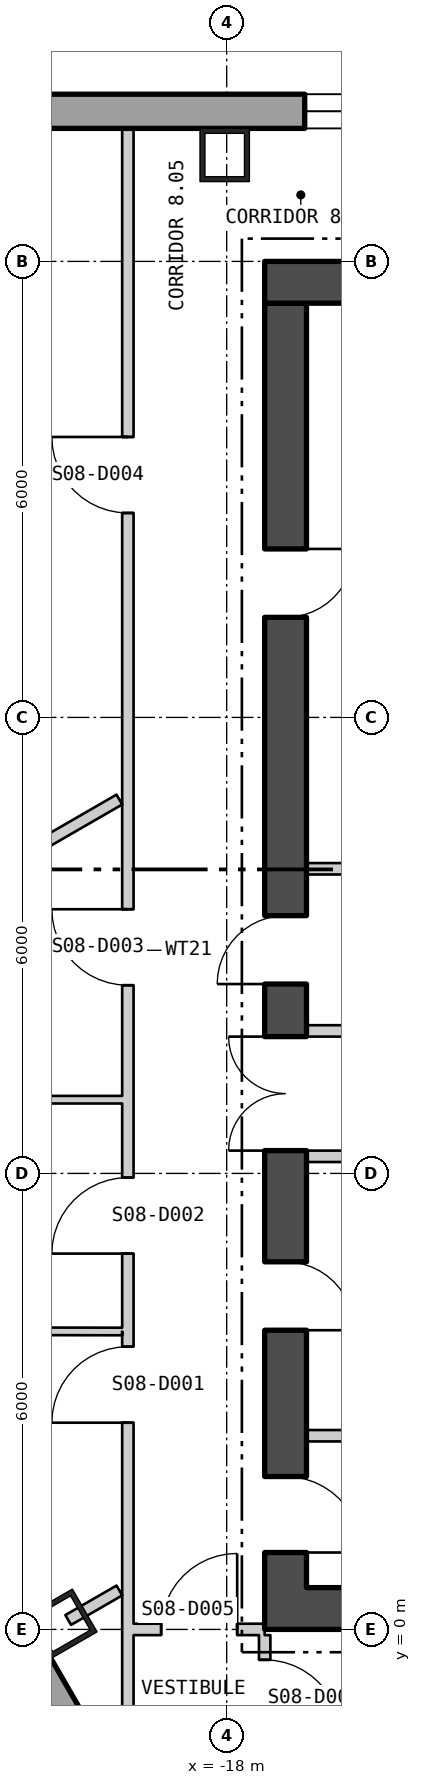
"""IFC4 building model, lengths in metres.
Left out: names, types, materials, properties, quantities, classifications, styles, units other than length and angle.
Written with IfcOpenShell. Run it as: python <this file> out.ifc"""

import sys

from ifc_helpers import new_model, si_unit, direction, frame, frame_2d, origin, origin_2d, place, context, subcontext, project, spatial, polyline, rectangle, hollow_rectangle, outline, extrude, element, fill, save


model = new_model("IFC4")
c1 = context("Model", 3, precision=1e-05, world=origin(), true_north=direction((0.0, 1.0)))
c2 = subcontext(c1, "Body", "Model", "MODEL_VIEW")
j1 = project(units=[si_unit("LENGTHUNIT", "METRE"), si_unit("PLANEANGLEUNIT", "RADIAN")], contexts=[c1])
p1 = place(None, origin())
s1 = spatial("IfcSite", under=j1, at=p1, CompositionType="ELEMENT")
p2 = place(p1, origin())
s2 = spatial("IfcBuilding", under=s1, at=p2, CompositionType="ELEMENT")
p3 = place(p2, frame((0.0, 0.0, 111.3)))
s3 = spatial("IfcBuildingStorey", under=s2, at=p3, CompositionType="ELEMENT", Elevation=111.3)
for number, where, z_axis, x_axis in (
    (1, (-18.026, 19.4, 0.0), (0.0, 0.0, 1.0), (-1.0, 0.0, 0.0)),
    (2, (-20.171, 0.074, 0.0), (0.0, 0.0, 1.0), (0.5, -0.866, 0.0)),
):
    element("IfcColumn", number, at=place(p3, frame(where, z_axis=z_axis, x_axis=x_axis)), inside=s3, PredefinedType="COLUMN", context=c2, shape_type="SweptSolid", body=[
        extrude(hollow_rectangle(XDim=0.65, YDim=0.7, WallThickness=0.065, at=origin_2d()), origin(), (0.0, 0.0, 1.0), 4.5),
    ])
p4 = place(p3, frame((22.865, 19.975, -0.4), z_axis=(0.0, 0.0, 1.0), x_axis=(-1.0, 0.0, 0.0)))
e3 = element("IfcWall", 3, at=p4, inside=s3, PredefinedType="SOLIDWALL", context=c2, shape_type="SweptSolid", body=[
    extrude(outline(polyline([(-0.13, -0.225), (45.86, -0.225), (45.6, 0.225), (0.13, 0.225), (-0.13, -0.225)])), origin(), (0.0, 0.0, 1.0), 4.5),
])
p5 = place(p4, frame((5.892, 0.0, 1.3)))
e4 = element("IfcOpeningElement", 4, at=p5, cuts=e3, PredefinedType="OPENING", context=c2, shape_type="SweptSolid", body=[
    extrude(rectangle(XDim=2.4, YDim=2.6, at=frame_2d((1.2, 1.3))), frame((0.0, 0.235, 0.0), z_axis=(0.0, -1.0, 0.0), x_axis=(1.0, 0.0, 0.0)), (0.0, 0.0, 1.0), 0.47),
])
p6 = place(p4, frame((10.399, 0.0, 1.3)))
e5 = element("IfcOpeningElement", 5, at=p6, cuts=e3, PredefinedType="OPENING", context=c2, shape_type="SweptSolid", body=[
    extrude(rectangle(XDim=2.4, YDim=2.6, at=frame_2d((1.2, 1.3))), frame((0.0, 0.235, 0.0), z_axis=(0.0, -1.0, 0.0), x_axis=(1.0, 0.0, 0.0)), (0.0, 0.0, 1.0), 0.47),
])
p7 = place(p4, frame((14.905, 0.0, 1.3)))
e6 = element("IfcOpeningElement", 6, at=p7, cuts=e3, PredefinedType="OPENING", context=c2, shape_type="SweptSolid", body=[
    extrude(rectangle(XDim=2.4, YDim=2.6, at=frame_2d((1.2, 1.3))), frame((0.0, 0.235, 0.0), z_axis=(0.0, -1.0, 0.0), x_axis=(1.0, 0.0, 0.0)), (0.0, 0.0, 1.0), 0.47),
])
p8 = place(p4, frame((19.412, 0.0, 1.3)))
e7 = element("IfcOpeningElement", 7, at=p8, cuts=e3, PredefinedType="OPENING", context=c2, shape_type="SweptSolid", body=[
    extrude(rectangle(XDim=2.4, YDim=2.6, at=frame_2d((1.2, 1.3))), frame((0.0, 0.235, 0.0), z_axis=(0.0, -1.0, 0.0), x_axis=(1.0, 0.0, 0.0)), (0.0, 0.0, 1.0), 0.47),
])
p9 = place(p4, frame((23.918, 0.0, 1.3)))
e8 = element("IfcOpeningElement", 8, at=p9, cuts=e3, PredefinedType="OPENING", context=c2, shape_type="SweptSolid", body=[
    extrude(rectangle(XDim=2.4, YDim=2.6, at=frame_2d((1.2, 1.3))), frame((0.0, 0.235, 0.0), z_axis=(0.0, -1.0, 0.0), x_axis=(1.0, 0.0, 0.0)), (0.0, 0.0, 1.0), 0.47),
])
p10 = place(p4, frame((28.425, 0.0, 1.3)))
e9 = element("IfcOpeningElement", 9, at=p10, cuts=e3, PredefinedType="OPENING", context=c2, shape_type="SweptSolid", body=[
    extrude(rectangle(XDim=2.4, YDim=2.6, at=frame_2d((1.2, 1.3))), frame((0.0, 0.235, 0.0), z_axis=(0.0, -1.0, 0.0), x_axis=(1.0, 0.0, 0.0)), (0.0, 0.0, 1.0), 0.47),
])
p11 = place(p4, frame((32.932, 0.0, 1.3)))
e10 = element("IfcOpeningElement", 10, at=p11, cuts=e3, PredefinedType="OPENING", context=c2, shape_type="SweptSolid", body=[
    extrude(rectangle(XDim=2.4, YDim=2.6, at=frame_2d((1.2, 1.3))), frame((0.0, 0.235, 0.0), z_axis=(0.0, -1.0, 0.0), x_axis=(1.0, 0.0, 0.0)), (0.0, 0.0, 1.0), 0.47),
])
p12 = place(p4, frame((37.438, 0.0, 1.3)))
e11 = element("IfcOpeningElement", 11, at=p12, cuts=e3, PredefinedType="OPENING", context=c2, shape_type="SweptSolid", body=[
    extrude(rectangle(XDim=2.4, YDim=2.6, at=frame_2d((1.2, 1.3))), frame((0.0, 0.235, 0.0), z_axis=(0.0, -1.0, 0.0), x_axis=(1.0, 0.0, 0.0)), (0.0, 0.0, 1.0), 0.47),
])
p13 = place(p3, frame((-27.595, 11.782, -0.18), z_axis=(0.0, 0.0, 1.0), x_axis=(0.500000141277, -0.866025322218, 0.0)))
e12 = element("IfcWall", 12, at=p13, inside=s3, PredefinedType="SOLIDWALL", context=c2, shape_type="SweptSolid", body=[
    extrude(outline(polyline([(-0.13, -0.225), (45.86, -0.225), (45.6, 0.225), (0.13, 0.225), (-0.13, -0.225)])), origin(), (0.0, 0.0, 1.0), 4.28),
])
p14 = place(p13, frame((1.424, 0.0, 1.08)))
e13 = element("IfcOpeningElement", 13, at=p14, cuts=e12, PredefinedType="OPENING", context=c2, shape_type="SweptSolid", body=[
    extrude(rectangle(XDim=2.4, YDim=2.6, at=frame_2d((1.2, 1.3))), frame((0.0, 0.235, 0.0), z_axis=(0.0, -1.0, 0.0), x_axis=(1.0, 0.0, 0.0)), (0.0, 0.0, 1.0), 0.47),
])
p15 = place(p13, frame((5.892, 0.0, 1.08)))
e14 = element("IfcOpeningElement", 14, at=p15, cuts=e12, PredefinedType="OPENING", context=c2, shape_type="SweptSolid", body=[
    extrude(rectangle(XDim=2.4, YDim=2.6, at=frame_2d((1.2, 1.3))), frame((0.0, 0.235, 0.0), z_axis=(0.0, -1.0, 0.0), x_axis=(1.0, 0.0, 0.0)), (0.0, 0.0, 1.0), 0.47),
])
p16 = place(p13, frame((10.399, 0.0, 1.08)))
e15 = element("IfcOpeningElement", 15, at=p16, cuts=e12, PredefinedType="OPENING", context=c2, shape_type="SweptSolid", body=[
    extrude(rectangle(XDim=2.4, YDim=2.6, at=frame_2d((1.2, 1.3))), frame((0.0, 0.235, 0.0), z_axis=(0.0, -1.0, 0.0), x_axis=(1.0, 0.0, 0.0)), (0.0, 0.0, 1.0), 0.47),
])
p17 = place(p13, frame((14.905, 0.0, 1.08)))
e16 = element("IfcOpeningElement", 16, at=p17, cuts=e12, PredefinedType="OPENING", context=c2, shape_type="SweptSolid", body=[
    extrude(rectangle(XDim=2.4, YDim=2.6, at=frame_2d((1.2, 1.3))), frame((0.0, 0.235, 0.0), z_axis=(0.0, -1.0, 0.0), x_axis=(1.0, 0.0, 0.0)), (0.0, 0.0, 1.0), 0.47),
])
p18 = place(p13, frame((19.412, 0.0, 1.08)))
e17 = element("IfcOpeningElement", 17, at=p18, cuts=e12, PredefinedType="OPENING", context=c2, shape_type="SweptSolid", body=[
    extrude(rectangle(XDim=2.4, YDim=2.6, at=frame_2d((1.2, 1.3))), frame((0.0, 0.235, 0.0), z_axis=(0.0, -1.0, 0.0), x_axis=(1.0, 0.0, 0.0)), (0.0, 0.0, 1.0), 0.47),
])
p19 = place(p13, frame((23.918, 0.0, 1.08)))
e18 = element("IfcOpeningElement", 18, at=p19, cuts=e12, PredefinedType="OPENING", context=c2, shape_type="SweptSolid", body=[
    extrude(rectangle(XDim=2.4, YDim=2.6, at=frame_2d((1.2, 1.3))), frame((0.0, 0.235, 0.0), z_axis=(0.0, -1.0, 0.0), x_axis=(1.0, 0.0, 0.0)), (0.0, 0.0, 1.0), 0.47),
])
p20 = place(p13, frame((28.425, 0.0, 1.08)))
e19 = element("IfcOpeningElement", 19, at=p20, cuts=e12, PredefinedType="OPENING", context=c2, shape_type="SweptSolid", body=[
    extrude(rectangle(XDim=2.4, YDim=2.6, at=frame_2d((1.2, 1.3))), frame((0.0, 0.235, 0.0), z_axis=(0.0, -1.0, 0.0), x_axis=(1.0, 0.0, 0.0)), (0.0, 0.0, 1.0), 0.47),
])
p21 = place(p13, frame((32.932, 0.0, 1.08)))
e20 = element("IfcOpeningElement", 20, at=p21, cuts=e12, PredefinedType="OPENING", context=c2, shape_type="SweptSolid", body=[
    extrude(rectangle(XDim=2.4, YDim=2.6, at=frame_2d((1.2, 1.3))), frame((0.0, 0.235, 0.0), z_axis=(0.0, -1.0, 0.0), x_axis=(1.0, 0.0, 0.0)), (0.0, 0.0, 1.0), 0.47),
])
p22 = place(p13, frame((37.438, 0.0, 1.08)))
e21 = element("IfcOpeningElement", 21, at=p22, cuts=e12, PredefinedType="OPENING", context=c2, shape_type="SweptSolid", body=[
    extrude(rectangle(XDim=2.4, YDim=2.6, at=frame_2d((1.2, 1.3))), frame((0.0, 0.235, 0.0), z_axis=(0.0, -1.0, 0.0), x_axis=(1.0, 0.0, 0.0)), (0.0, 0.0, 1.0), 0.47),
])
p23 = place(p13, frame((41.907, 0.0, 1.08)))
e22 = element("IfcOpeningElement", 22, at=p23, cuts=e12, PredefinedType="OPENING", context=c2, shape_type="SweptSolid", body=[
    extrude(rectangle(XDim=2.4, YDim=2.6, at=frame_2d((1.2, 1.3))), frame((0.0, 0.235, 0.0), z_axis=(0.0, -1.0, 0.0), x_axis=(1.0, 0.0, 0.0)), (0.0, 0.0, 1.0), 0.47),
])
p24 = place(p3, frame((-17.5, 0.275, 0.0), z_axis=(0.0, 0.0, 1.0), x_axis=(1.0, 0.0, 0.0)))
e23 = element("IfcWall", 23, at=p24, inside=s3, PredefinedType="SHEAR", context=c2, shape_type="SweptSolid", body=[
    extrude(rectangle(XDim=35.0, YDim=0.55, at=frame_2d((17.5, 0.0))), origin(), (0.0, 0.0, 1.0), 4.3),
])
p25 = place(p24, frame((12.0, 0.0, 0.0)))
e24 = element("IfcOpeningElement", 24, at=p25, cuts=e23, PredefinedType="OPENING", context=c2, shape_type="SweptSolid", body=[
    extrude(rectangle(XDim=1.8, YDim=2.4, at=frame_2d((0.9, 1.2))), frame((0.0, 0.285, 0.0), z_axis=(0.0, -1.0, 0.0), x_axis=(1.0, 0.0, 0.0)), (0.0, 0.0, 1.0), 0.57),
])
p26 = place(p24, frame((22.0, 0.0, 0.0)))
e25 = element("IfcOpeningElement", 25, at=p26, cuts=e23, PredefinedType="OPENING", context=c2, shape_type="SweptSolid", body=[
    extrude(rectangle(XDim=1.8, YDim=2.4, at=frame_2d((0.9, 1.2))), frame((0.0, 0.285, 0.0), z_axis=(0.0, -1.0, 0.0), x_axis=(1.0, 0.0, 0.0)), (0.0, 0.0, 1.0), 0.57),
])
p27 = place(p3, frame((-17.5, 17.725, 0.0), z_axis=(0.0, 0.0, 1.0), x_axis=(1.0, 0.0, 0.0)))
e26 = element("IfcWall", 26, at=p27, inside=s3, PredefinedType="SHEAR", context=c2, shape_type="SweptSolid", body=[
    extrude(rectangle(XDim=35.0, YDim=0.55, at=frame_2d((17.5, 0.0))), origin(), (0.0, 0.0, 1.0), 4.3),
])
p28 = place(p3, frame((-17.225, 0.55, 0.0), z_axis=(0.0, 0.0, 1.0), x_axis=(0.0, 1.0, 0.0)))
e27 = element("IfcWall", 27, at=p28, inside=s3, PredefinedType="SHEAR", context=c2, shape_type="SweptSolid", body=[
    extrude(rectangle(XDim=16.9, YDim=0.55, at=frame_2d((8.45, 0.0))), origin(), (0.0, 0.0, 1.0), 4.3),
])
p29 = place(p28, frame((5.75, 0.0, 0.0)))
e28 = element("IfcOpeningElement", 28, at=p29, cuts=e27, PredefinedType="OPENING", context=c2, shape_type="SweptSolid", body=[
    extrude(rectangle(XDim=1.5, YDim=2.1, at=frame_2d((0.75, 1.05))), frame((0.0, 0.285, 0.0), z_axis=(0.0, -1.0, 0.0), x_axis=(1.0, 0.0, 0.0)), (0.0, 0.0, 1.0), 0.57),
])
p30 = place(p28, frame((0.462, 0.0, 0.0)))
e29 = element("IfcOpeningElement", 29, at=p30, cuts=e27, PredefinedType="OPENING", context=c2, shape_type="SweptSolid", body=[
    extrude(rectangle(XDim=1.0, YDim=2.1, at=frame_2d((0.5, 1.05))), frame((0.0, 0.285, 0.0), z_axis=(0.0, -1.0, 0.0), x_axis=(1.0, 0.0, 0.0)), (0.0, 0.0, 1.0), 0.57),
])
p31 = place(p28, frame((3.387, 0.0, 0.0)))
e30 = element("IfcOpeningElement", 30, at=p31, cuts=e27, PredefinedType="OPENING", context=c2, shape_type="SweptSolid", body=[
    extrude(rectangle(XDim=0.9, YDim=2.1, at=frame_2d((0.45, 1.05))), frame((0.0, 0.285, 0.0), z_axis=(0.0, -1.0, 0.0), x_axis=(1.0, 0.0, 0.0)), (0.0, 0.0, 1.0), 0.57),
])
p32 = place(p28, frame((7.942, 0.0, 0.0)))
e31 = element("IfcOpeningElement", 31, at=p32, cuts=e27, PredefinedType="OPENING", context=c2, shape_type="SweptSolid", body=[
    extrude(rectangle(XDim=0.9, YDim=2.1, at=frame_2d((0.45, 1.05))), frame((0.0, 0.285, 0.0), z_axis=(0.0, -1.0, 0.0), x_axis=(1.0, 0.0, 0.0)), (0.0, 0.0, 1.0), 0.57),
])
p33 = place(p28, frame((12.767, 0.0, 0.0)))
e32 = element("IfcOpeningElement", 32, at=p33, cuts=e27, PredefinedType="OPENING", context=c2, shape_type="SweptSolid", body=[
    extrude(rectangle(XDim=0.9, YDim=2.1, at=frame_2d((0.45, 1.05))), frame((0.0, 0.285, 0.0), z_axis=(0.0, -1.0, 0.0), x_axis=(1.0, 0.0, 0.0)), (0.0, 0.0, 1.0), 0.57),
])
for number, where, z_axis, x_axis in (
    (33, (-16.95, 6.225, 0.0), (0.0, 0.0, 1.0), (1.0, 0.0, 0.0)),
    (34, (-16.95, 7.875, 0.0), (0.0, 0.0, 1.0), (1.0, 0.0, 0.0)),
    (35, (-16.95, 2.549, 0.0), (0.0, 0.0, 1.0), (1.0, 0.0, 0.0)),
    (36, (-16.95, 10.008, 0.0), (0.0, 0.0, 1.0), (1.0, 0.0, 0.0)),
):
    element("IfcWall", number, at=place(p3, frame(where, z_axis=z_axis, x_axis=x_axis)), inside=s3, PredefinedType="PARTITIONING", context=c2, shape_type="SweptSolid", body=[
        extrude(rectangle(XDim=2.45, YDim=0.15, at=frame_2d((1.225, 0.0))), origin(), (0.0, 0.0, 1.0), 4.3),
    ])
p34 = place(p3, frame((-24.592, 7.93, 0.0), z_axis=(0.0, 0.0, 1.0), x_axis=(0.866146611104, 0.499790003975, 0.0)))
e37 = element("IfcWall", 37, at=p34, inside=s3, PredefinedType="PARTITIONING", context=c2, shape_type="SweptSolid", body=[
    extrude(rectangle(XDim=5.981, YDim=0.15, at=frame_2d((2.99, 0.0))), origin(), (0.0, 0.0, 1.0), 4.3),
])
p35 = place(p3, frame((-24.557, 6.97, 0.0), z_axis=(0.0, 0.0, 1.0), x_axis=(1.0, 0.0, 0.0)))
e38 = element("IfcWall", 38, at=p35, inside=s3, PredefinedType="PARTITIONING", context=c2, shape_type="SweptSolid", body=[
    extrude(rectangle(XDim=5.182, YDim=0.1, at=frame_2d((2.591, 0.0))), origin(), (0.0, 0.0, 1.0), 4.3),
])
p36 = place(p3, frame((-22.325, 3.925, 0.0), z_axis=(0.0, 0.0, 1.0), x_axis=(0.999998563634, -0.00169491282, 0.0)))
e39 = element("IfcWall", 39, at=p36, inside=s3, PredefinedType="PARTITIONING", context=c2, shape_type="SweptSolid", body=[
    extrude(rectangle(XDim=2.95, YDim=0.1, at=frame_2d((1.475, 0.0))), origin(), (0.0, 0.0, 1.0), 4.3),
])
p37 = place(p3, frame((-20.085, 0.124, 0.0), z_axis=(0.0, 0.0, 1.0), x_axis=(0.86633556233, 0.499462404434, 0.0)))
e40 = element("IfcWall", 40, at=p37, inside=s3, PredefinedType="PARTITIONING", context=c2, shape_type="SweptSolid", body=[
    extrude(rectangle(XDim=0.777, YDim=0.15, at=frame_2d((0.388, 0.0))), origin(), (0.0, 0.0, 1.0), 4.3),
])
p38 = place(p3, frame((-19.3, -1.875, 0.0), z_axis=(0.0, 0.0, 1.0), x_axis=(0.0, 1.0, 0.0)))
e41 = element("IfcWall", 41, at=p38, inside=s3, PredefinedType="PARTITIONING", context=c2, shape_type="SweptSolid", body=[
    extrude(rectangle(XDim=21.622, YDim=0.15, at=frame_2d((10.811, 0.0))), origin(), (0.0, 0.0, 1.0), 4.3),
])
p39 = place(p38, frame((4.595, 0.0, 0.0)))
e42 = element("IfcOpeningElement", 42, at=p39, cuts=e41, PredefinedType="OPENING", context=c2, shape_type="SweptSolid", body=[
    extrude(rectangle(XDim=1.0, YDim=2.1, at=frame_2d((0.5, 1.05))), frame((0.0, 0.085, 0.0), z_axis=(0.0, -1.0, 0.0), x_axis=(1.0, 0.0, 0.0)), (0.0, 0.0, 1.0), 0.17),
])
p40 = place(p38, frame((6.82, 0.0, 0.0)))
e43 = element("IfcOpeningElement", 43, at=p40, cuts=e41, PredefinedType="OPENING", context=c2, shape_type="SweptSolid", body=[
    extrude(rectangle(XDim=1.0, YDim=2.1, at=frame_2d((0.5, 1.05))), frame((0.0, 0.085, 0.0), z_axis=(0.0, -1.0, 0.0), x_axis=(1.0, 0.0, 0.0)), (0.0, 0.0, 1.0), 0.17),
])
p41 = place(p38, frame((10.351, 0.0, 0.0)))
e44 = element("IfcOpeningElement", 44, at=p41, cuts=e41, PredefinedType="OPENING", context=c2, shape_type="SweptSolid", body=[
    extrude(rectangle(XDim=1.0, YDim=2.1, at=frame_2d((0.5, 1.05))), frame((0.0, 0.085, 0.0), z_axis=(0.0, -1.0, 0.0), x_axis=(1.0, 0.0, 0.0)), (0.0, 0.0, 1.0), 0.17),
])
p42 = place(p38, frame((16.565, 0.0, 0.0)))
e45 = element("IfcOpeningElement", 45, at=p42, cuts=e41, PredefinedType="OPENING", context=c2, shape_type="SweptSolid", body=[
    extrude(rectangle(XDim=1.0, YDim=2.1, at=frame_2d((0.5, 1.05))), frame((0.0, 0.085, 0.0), z_axis=(0.0, -1.0, 0.0), x_axis=(1.0, 0.0, 0.0)), (0.0, 0.0, 1.0), 0.17),
])
p43 = place(p3, frame((-19.225, 0.0, 0.0), z_axis=(0.0, 0.0, 1.0), x_axis=(1.0, 0.0, 0.0)))
e46 = element("IfcWall", 46, at=p43, inside=s3, PredefinedType="PARTITIONING", context=c2, shape_type="SweptSolid", body=[
    extrude(rectangle(XDim=1.725, YDim=0.15, at=frame_2d((0.863, 0.0))), origin(), (0.0, 0.0, 1.0), 3.7),
])
p44 = place(p43, frame((0.363, 0.0, 0.0)))
e47 = element("IfcOpeningElement", 47, at=p44, cuts=e46, PredefinedType="OPENING", context=c2, shape_type="SweptSolid", body=[
    extrude(rectangle(XDim=1.0, YDim=2.1, at=frame_2d((0.5, 1.05))), frame((0.0, 0.085, 0.0), z_axis=(0.0, -1.0, 0.0), x_axis=(1.0, 0.0, 0.0)), (0.0, 0.0, 1.0), 0.17),
])
p45 = place(p3, frame((-17.5, -1.725, 0.0), z_axis=(0.0, 0.0, 1.0), x_axis=(0.0, 1.0, 0.0)))
e48 = element("IfcWall", 48, at=p45, inside=s3, PredefinedType="PARTITIONING", context=c2, shape_type="SweptSolid", body=[
    extrude(rectangle(XDim=1.65, YDim=0.15, at=frame_2d((0.825, 0.0))), origin(), (0.0, 0.0, 1.0), 4.3),
])
p46 = place(p45, frame((0.325, 0.0, 0.0)))
e49 = element("IfcOpeningElement", 49, at=p46, cuts=e48, PredefinedType="OPENING", context=c2, shape_type="SweptSolid", body=[
    extrude(rectangle(XDim=1.0, YDim=2.1, at=frame_2d((0.5, 1.05))), frame((0.0, 0.085, 0.0), z_axis=(0.0, -1.0, 0.0), x_axis=(1.0, 0.0, 0.0)), (0.0, 0.0, 1.0), 0.17),
])
p47 = place(p12, origin())
e50 = element("IfcWindow", 50, at=p47, inside=s3, PartitioningType="SINGLE_PANEL", PredefinedType="WINDOW", context=c2, shape_type="SweptSolid", body=[
    extrude(rectangle(XDim=2.4, YDim=2.6, at=frame_2d((1.2, 1.3))), frame((0.0, 0.105, 0.0), z_axis=(0.0, -1.0, 0.0), x_axis=(1.0, 0.0, 0.0)), (0.0, 0.0, 1.0), 0.06),
])
fill(e11, e50)
p48 = place(p29, origin())
e51 = element("IfcDoor", 51, at=p48, inside=s3, OperationType="DOUBLE_DOOR_SINGLE_SWING", PredefinedType="DOOR", context=c2, shape_type="SweptSolid", body=[
    extrude(rectangle(XDim=1.5, YDim=2.1, at=frame_2d((0.75, 1.05))), frame((0.0, 0.025, 0.0), z_axis=(0.0, -1.0, 0.0), x_axis=(1.0, 0.0, 0.0)), (0.0, 0.0, 1.0), 0.05),
])
fill(e28, e51)
p49 = place(p30, origin())
e52 = element("IfcDoor", 52, at=p49, inside=s3, OperationType="SINGLE_SWING_LEFT", PredefinedType="DOOR", context=c2, shape_type="SweptSolid", body=[
    extrude(rectangle(XDim=1.0, YDim=2.1, at=frame_2d((0.5, 1.05))), frame((0.0, 0.025, 0.0), z_axis=(0.0, -1.0, 0.0), x_axis=(1.0, 0.0, 0.0)), (0.0, 0.0, 1.0), 0.05),
])
fill(e29, e52)
p50 = place(p31, origin())
e53 = element("IfcDoor", 53, at=p50, inside=s3, OperationType="SINGLE_SWING_LEFT", PredefinedType="DOOR", context=c2, shape_type="SweptSolid", body=[
    extrude(rectangle(XDim=0.9, YDim=2.1, at=frame_2d((0.45, 1.05))), frame((0.0, 0.025, 0.0), z_axis=(0.0, -1.0, 0.0), x_axis=(1.0, 0.0, 0.0)), (0.0, 0.0, 1.0), 0.05),
])
fill(e30, e53)
p51 = place(p32, origin())
e54 = element("IfcDoor", 54, at=p51, inside=s3, OperationType="SINGLE_SWING_RIGHT", PredefinedType="DOOR", context=c2, shape_type="SweptSolid", body=[
    extrude(rectangle(XDim=0.9, YDim=2.1, at=frame_2d((0.45, 1.05))), frame((0.0, 0.025, 0.0), z_axis=(0.0, -1.0, 0.0), x_axis=(1.0, 0.0, 0.0)), (0.0, 0.0, 1.0), 0.05),
])
fill(e31, e54)
p52 = place(p33, origin())
e55 = element("IfcDoor", 55, at=p52, inside=s3, OperationType="SINGLE_SWING_RIGHT", PredefinedType="DOOR", context=c2, shape_type="SweptSolid", body=[
    extrude(rectangle(XDim=0.9, YDim=2.1, at=frame_2d((0.45, 1.05))), frame((0.0, 0.025, 0.0), z_axis=(0.0, -1.0, 0.0), x_axis=(1.0, 0.0, 0.0)), (0.0, 0.0, 1.0), 0.05),
])
fill(e32, e55)
p53 = place(p39, origin())
e56 = element("IfcDoor", 56, at=p53, inside=s3, OperationType="SINGLE_SWING_RIGHT", PredefinedType="DOOR", context=c2, shape_type="SweptSolid", body=[
    extrude(rectangle(XDim=1.0, YDim=2.1, at=frame_2d((0.5, 1.05))), frame((0.0, 0.025, 0.0), z_axis=(0.0, -1.0, 0.0), x_axis=(1.0, 0.0, 0.0)), (0.0, 0.0, 1.0), 0.05),
])
fill(e42, e56)
p54 = place(p40, origin())
e57 = element("IfcDoor", 57, at=p54, inside=s3, OperationType="SINGLE_SWING_RIGHT", PredefinedType="DOOR", context=c2, shape_type="SweptSolid", body=[
    extrude(rectangle(XDim=1.0, YDim=2.1, at=frame_2d((0.5, 1.05))), frame((0.0, 0.025, 0.0), z_axis=(0.0, -1.0, 0.0), x_axis=(1.0, 0.0, 0.0)), (0.0, 0.0, 1.0), 0.05),
])
fill(e43, e57)
p55 = place(p41, origin())
e58 = element("IfcDoor", 58, at=p55, inside=s3, OperationType="SINGLE_SWING_LEFT", PredefinedType="DOOR", context=c2, shape_type="SweptSolid", body=[
    extrude(rectangle(XDim=1.0, YDim=2.1, at=frame_2d((0.5, 1.05))), frame((0.0, 0.025, 0.0), z_axis=(0.0, -1.0, 0.0), x_axis=(1.0, 0.0, 0.0)), (0.0, 0.0, 1.0), 0.05),
])
fill(e44, e58)
p56 = place(p42, origin())
e59 = element("IfcDoor", 59, at=p56, inside=s3, OperationType="SINGLE_SWING_LEFT", PredefinedType="DOOR", context=c2, shape_type="SweptSolid", body=[
    extrude(rectangle(XDim=1.0, YDim=2.1, at=frame_2d((0.5, 1.05))), frame((0.0, 0.025, 0.0), z_axis=(0.0, -1.0, 0.0), x_axis=(1.0, 0.0, 0.0)), (0.0, 0.0, 1.0), 0.05),
])
fill(e45, e59)
p57 = place(p44, origin())
e60 = element("IfcDoor", 60, at=p57, inside=s3, OperationType="SINGLE_SWING_LEFT", PredefinedType="DOOR", context=c2, shape_type="SweptSolid", body=[
    extrude(rectangle(XDim=1.0, YDim=2.1, at=frame_2d((0.5, 1.05))), frame((0.0, 0.025, 0.0), z_axis=(0.0, -1.0, 0.0), x_axis=(1.0, 0.0, 0.0)), (0.0, 0.0, 1.0), 0.05),
])
fill(e47, e60)
p58 = place(p46, origin())
e61 = element("IfcDoor", 61, at=p58, inside=s3, OperationType="SINGLE_SWING_LEFT", PredefinedType="DOOR", context=c2, shape_type="SweptSolid", body=[
    extrude(rectangle(XDim=1.0, YDim=2.1, at=frame_2d((0.5, 1.05))), frame((0.0, 0.025, 0.0), z_axis=(0.0, -1.0, 0.0), x_axis=(1.0, 0.0, 0.0)), (0.0, 0.0, 1.0), 0.05),
])
fill(e49, e61)
save(model, sys.argv[1])
